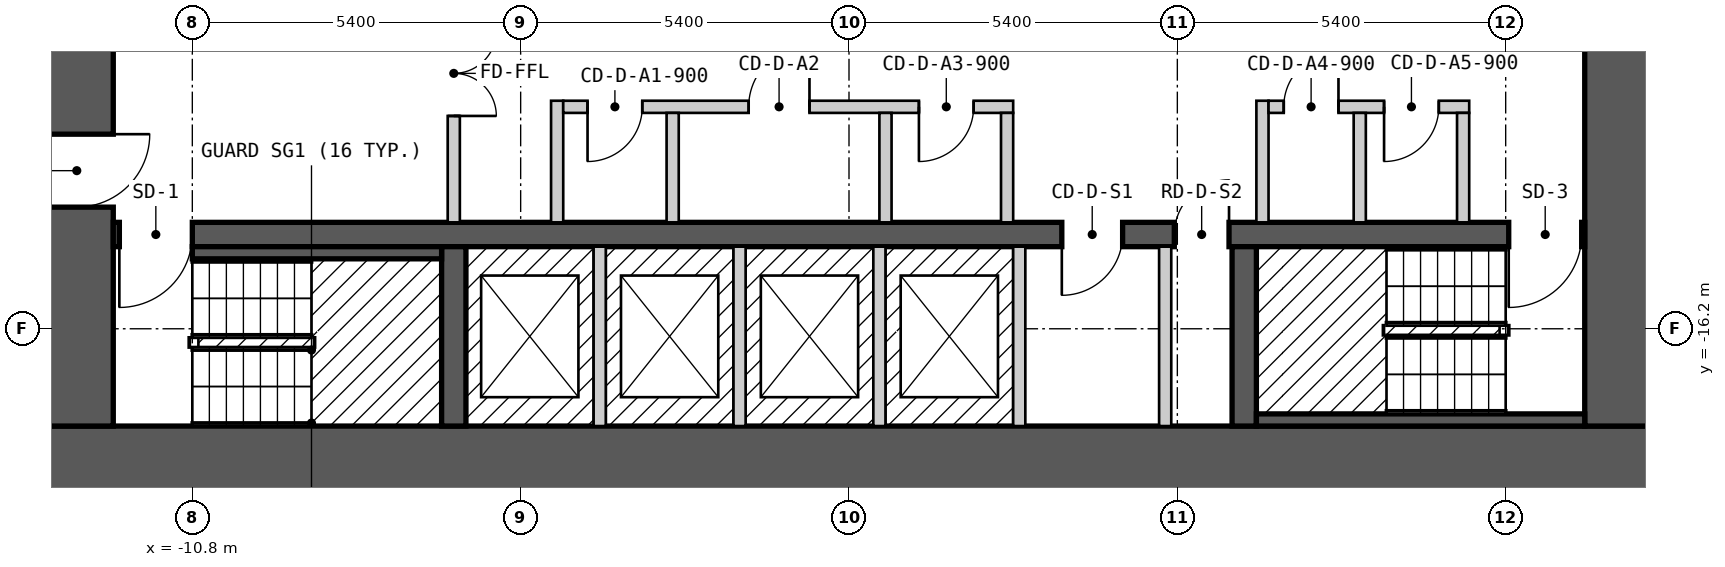
"""IFC4 building model, lengths in metres.
Left out: names, types, materials, properties, quantities, classifications, styles, units other than length and angle.
Written with IfcOpenShell. Run it as: python <this file> out.ifc"""

import sys

from ifc_helpers import new_model, si_unit, direction, frame, frame_2d, origin, place, context, subcontext, project, spatial, rectangle, extrude, element, fill, save


model = new_model("IFC4")
c1 = context("Model", 3, precision=1e-05, world=origin(), true_north=direction((0.0, 1.0)))
c2 = subcontext(c1, "Body", "Model", "MODEL_VIEW")
j1 = project(units=[si_unit("LENGTHUNIT", "METRE"), si_unit("PLANEANGLEUNIT", "RADIAN")], contexts=[c1])
p1 = place(None, origin())
s1 = spatial("IfcSite", under=j1, at=p1, CompositionType="ELEMENT")
p2 = place(p1, origin())
s2 = spatial("IfcBuilding", under=s1, at=p2, CompositionType="ELEMENT")
p3 = place(p2, frame((0.0, 0.0, 29.4)))
s3 = spatial("IfcBuildingStorey", under=s2, at=p3, CompositionType="ELEMENT", Elevation=29.4)
p4 = place(p3, frame((-13.3, -18.4, 0.0), z_axis=(0.0, 0.0, 1.0), x_axis=(1.0, 0.0, 0.0)))
e1 = element("IfcWall", 1, at=p4, inside=s3, PredefinedType="SHEAR", context=c2, shape_type="SweptSolid", body=[
    extrude(rectangle(XDim=26.6, YDim=1.2, at=frame_2d((13.3, 0.0))), origin(), (0.0, 0.0, 1.0), 2.7),
])
p5 = place(p3, frame((-12.7, -17.8, 0.0), z_axis=(0.0, 0.0, 1.0), x_axis=(0.0, 1.0, 0.0)))
e2 = element("IfcWall", 2, at=p5, inside=s3, PredefinedType="SHEAR", context=c2, shape_type="SweptSolid", body=[
    extrude(rectangle(XDim=11.6, YDim=1.2, at=frame_2d((5.8, 0.0))), origin(), (0.0, 0.0, 1.0), 2.7),
])
p6 = place(p5, frame((3.6, 0.0, 0.0)))
e3 = element("IfcOpeningElement", 3, at=p6, cuts=e2, PredefinedType="OPENING", context=c2, shape_type="SweptSolid", body=[
    extrude(rectangle(XDim=1.2, YDim=2.1, at=frame_2d((0.6, 1.05))), frame((0.0, 0.61, 0.0), z_axis=(0.0, -1.0, 0.0), x_axis=(1.0, 0.0, 0.0)), (0.0, 0.0, 1.0), 1.22),
])
p7 = place(p3, frame((12.7, -17.8, 0.0), z_axis=(0.0, 0.0, 1.0), x_axis=(0.0, 1.0, 0.0)))
e4 = element("IfcWall", 4, at=p7, inside=s3, PredefinedType="SHEAR", context=c2, shape_type="SweptSolid", body=[
    extrude(rectangle(XDim=11.6, YDim=1.2, at=frame_2d((5.8, 0.0))), origin(), (0.0, 0.0, 1.0), 2.7),
])
p8 = place(p3, frame((-12.1, -14.65, 0.0), z_axis=(0.0, 0.0, 1.0), x_axis=(1.0, 0.0, 0.0)))
e5 = element("IfcWall", 5, at=p8, inside=s3, PredefinedType="SHEAR", context=c2, shape_type="SweptSolid", body=[
    extrude(rectangle(XDim=24.2, YDim=0.4, at=frame_2d((12.1, 0.0))), origin(), (0.0, 0.0, 1.0), 2.7),
])
p9 = place(p8, frame((1.3, 0.0, 0.0), z_axis=(0.0, 0.0, 1.0), x_axis=(-1.0, 0.0, 0.0)))
e6 = element("IfcOpeningElement", 6, at=p9, cuts=e5, PredefinedType="OPENING", context=c2, shape_type="SweptSolid", body=[
    extrude(rectangle(XDim=1.2, YDim=2.1, at=frame_2d((0.6, 1.05))), frame((0.0, 0.21, 0.0), z_axis=(0.0, -1.0, 0.0), x_axis=(1.0, 0.0, 0.0)), (0.0, 0.0, 1.0), 0.42),
])
p10 = place(p8, frame((24.15, 0.0, 0.0), z_axis=(0.0, 0.0, 1.0), x_axis=(-1.0, 0.0, 0.0)))
e7 = element("IfcOpeningElement", 7, at=p10, cuts=e5, PredefinedType="OPENING", context=c2, shape_type="SweptSolid", body=[
    extrude(rectangle(XDim=1.2, YDim=2.1, at=frame_2d((0.6, 1.05))), frame((0.0, 0.21, 0.0), z_axis=(0.0, -1.0, 0.0), x_axis=(1.0, 0.0, 0.0)), (0.0, 0.0, 1.0), 0.42),
])
p11 = place(p8, frame((16.6, 0.0, 0.0), z_axis=(0.0, 0.0, 1.0), x_axis=(-1.0, 0.0, 0.0)))
e8 = element("IfcOpeningElement", 8, at=p11, cuts=e5, PredefinedType="OPENING", context=c2, shape_type="SweptSolid", body=[
    extrude(rectangle(XDim=1.0, YDim=2.1, at=frame_2d((0.5, 1.05))), frame((0.0, 0.21, 0.0), z_axis=(0.0, -1.0, 0.0), x_axis=(1.0, 0.0, 0.0)), (0.0, 0.0, 1.0), 0.42),
])
p12 = place(p8, frame((18.35, 0.0, 0.0), z_axis=(0.0, 0.0, 1.0), x_axis=(-1.0, 0.0, 0.0)))
e9 = element("IfcOpeningElement", 9, at=p12, cuts=e5, PredefinedType="OPENING", context=c2, shape_type="SweptSolid", body=[
    extrude(rectangle(XDim=0.9, YDim=2.1, at=frame_2d((0.45, 1.05))), frame((0.0, 0.21, 0.0), z_axis=(0.0, -1.0, 0.0), x_axis=(1.0, 0.0, 0.0)), (0.0, 0.0, 1.0), 0.42),
])
for number, where, z_axis, x_axis in (
    (10, (-6.5, -17.8, 0.0), (0.0, 0.0, 1.0), (0.0, 1.0, 0.0)),
    (11, (6.5, -17.8, 0.0), (0.0, 0.0, 1.0), (0.0, 1.0, 0.0)),
):
    element("IfcWall", number, at=place(p3, frame(where, z_axis=z_axis, x_axis=x_axis)), inside=s3, PredefinedType="SHEAR", context=c2, shape_type="SweptSolid", body=[
        extrude(rectangle(XDim=2.95, YDim=0.4, at=frame_2d((1.475, 0.0))), origin(), (0.0, 0.0, 1.0), 2.7),
    ])
p13 = place(p3, frame((-10.8, -14.95, 0.0), z_axis=(0.0, 0.0, 1.0), x_axis=(1.0, 0.0, 0.0)))
e12 = element("IfcWall", 12, at=p13, inside=s3, PredefinedType="SOLIDWALL", context=c2, shape_type="SweptSolid", body=[
    extrude(rectangle(XDim=4.1, YDim=0.2, at=frame_2d((2.05, 0.0))), origin(), (0.0, 0.0, 1.0), 2.7),
])
p14 = place(p3, frame((-6.5, -14.45, 0.0), z_axis=(0.0, 0.0, 1.0), x_axis=(0.0, 1.0, 0.0)))
e13 = element("IfcWall", 13, at=p14, inside=s3, PredefinedType="PARTITIONING", context=c2, shape_type="SweptSolid", body=[
    extrude(rectangle(XDim=4.9, YDim=0.2, at=frame_2d((2.45, 0.0))), origin(), (0.0, 0.0, 1.0), 2.7),
])
p15 = place(p14, frame((3.15, 0.0, 0.0), z_axis=(0.0, 0.0, 1.0), x_axis=(-1.0, 0.0, 0.0)))
e14 = element("IfcOpeningElement", 14, at=p15, cuts=e13, PredefinedType="OPENING", context=c2, shape_type="SweptSolid", body=[
    extrude(rectangle(XDim=1.4, YDim=2.1, at=frame_2d((0.7, 1.05))), frame((0.0, 0.11, 0.0), z_axis=(0.0, -1.0, 0.0), x_axis=(1.0, 0.0, 0.0)), (0.0, 0.0, 1.0), 0.22),
])
p16 = place(p3, frame((-4.8, -14.45, 0.0), z_axis=(0.0, 0.0, 1.0), x_axis=(0.0, 1.0, 0.0)))
e15 = element("IfcWall", 15, at=p16, inside=s3, PredefinedType="PARTITIONING", context=c2, shape_type="SweptSolid", body=[
    extrude(rectangle(XDim=2.0, YDim=0.2, at=frame_2d((1.0, 0.0))), origin(), (0.0, 0.0, 1.0), 2.7),
])
p17 = place(p3, frame((-4.7, -12.55, 0.0), z_axis=(0.0, 0.0, 1.0), x_axis=(1.0, 0.0, 0.0)))
e16 = element("IfcWall", 16, at=p17, inside=s3, PredefinedType="PARTITIONING", context=c2, shape_type="SweptSolid", body=[
    extrude(rectangle(XDim=7.4, YDim=0.2, at=frame_2d((3.7, 0.0))), origin(), (0.0, 0.0, 1.0), 2.7),
])
p18 = place(p17, frame((1.3, 0.0, 0.0), z_axis=(0.0, 0.0, 1.0), x_axis=(-1.0, 0.0, 0.0)))
e17 = element("IfcOpeningElement", 17, at=p18, cuts=e16, PredefinedType="OPENING", context=c2, shape_type="SweptSolid", body=[
    extrude(rectangle(XDim=0.9, YDim=2.1, at=frame_2d((0.45, 1.05))), frame((0.0, 0.11, 0.0), z_axis=(0.0, -1.0, 0.0), x_axis=(1.0, 0.0, 0.0)), (0.0, 0.0, 1.0), 0.22),
])
p19 = place(p17, frame((4.05, 0.0, 0.0), z_axis=(0.0, 0.0, 1.0), x_axis=(-1.0, 0.0, 0.0)))
e18 = element("IfcOpeningElement", 18, at=p19, cuts=e16, PredefinedType="OPENING", context=c2, shape_type="SweptSolid", body=[
    extrude(rectangle(XDim=1.0, YDim=2.1, at=frame_2d((0.5, 1.05))), frame((0.0, 0.11, 0.0), z_axis=(0.0, -1.0, 0.0), x_axis=(1.0, 0.0, 0.0)), (0.0, 0.0, 1.0), 0.22),
])
p20 = place(p17, frame((6.75, 0.0, 0.0), z_axis=(0.0, 0.0, 1.0), x_axis=(-1.0, 0.0, 0.0)))
e19 = element("IfcOpeningElement", 19, at=p20, cuts=e16, PredefinedType="OPENING", context=c2, shape_type="SweptSolid", body=[
    extrude(rectangle(XDim=0.9, YDim=2.1, at=frame_2d((0.45, 1.05))), frame((0.0, 0.11, 0.0), z_axis=(0.0, -1.0, 0.0), x_axis=(1.0, 0.0, 0.0)), (0.0, 0.0, 1.0), 0.22),
])
p21 = place(p3, frame((-4.1, -17.8, 0.0), z_axis=(0.0, 0.0, 1.0), x_axis=(0.0, 1.0, 0.0)))
e20 = element("IfcWall", 20, at=p21, inside=s3, PredefinedType="SOLIDWALL", context=c2, shape_type="SweptSolid", body=[
    extrude(rectangle(XDim=2.95, YDim=0.2, at=frame_2d((1.475, 0.0))), origin(), (0.0, 0.0, 1.0), 2.7),
])
p22 = place(p3, frame((-2.9, -14.45, 0.0), z_axis=(0.0, 0.0, 1.0), x_axis=(0.0, 1.0, 0.0)))
e21 = element("IfcWall", 21, at=p22, inside=s3, PredefinedType="PARTITIONING", context=c2, shape_type="SweptSolid", body=[
    extrude(rectangle(XDim=1.8, YDim=0.2, at=frame_2d((0.9, 0.0))), origin(), (0.0, 0.0, 1.0), 2.7),
])
for number, where, z_axis, x_axis in (
    (22, (-1.8, -17.8, 0.0), (0.0, 0.0, 1.0), (0.0, 1.0, 0.0)),
    (23, (0.5, -17.8, 0.0), (0.0, 0.0, 1.0), (0.0, 1.0, 0.0)),
):
    element("IfcWall", number, at=place(p3, frame(where, z_axis=z_axis, x_axis=x_axis)), inside=s3, PredefinedType="SOLIDWALL", context=c2, shape_type="SweptSolid", body=[
        extrude(rectangle(XDim=2.95, YDim=0.2, at=frame_2d((1.475, 0.0))), origin(), (0.0, 0.0, 1.0), 2.7),
    ])
for number, where, z_axis, x_axis in (
    (24, (0.6, -14.45, 0.0), (0.0, 0.0, 1.0), (0.0, 1.0, 0.0)),
    (25, (2.6, -14.45, 0.0), (0.0, 0.0, 1.0), (0.0, 1.0, 0.0)),
):
    element("IfcWall", number, at=place(p3, frame(where, z_axis=z_axis, x_axis=x_axis)), inside=s3, PredefinedType="PARTITIONING", context=c2, shape_type="SweptSolid", body=[
        extrude(rectangle(XDim=1.8, YDim=0.2, at=frame_2d((0.9, 0.0))), origin(), (0.0, 0.0, 1.0), 2.7),
    ])
p23 = place(p3, frame((2.8, -17.8, 0.0), z_axis=(0.0, 0.0, 1.0), x_axis=(0.0, 1.0, 0.0)))
e26 = element("IfcWall", 26, at=p23, inside=s3, PredefinedType="SOLIDWALL", context=c2, shape_type="SweptSolid", body=[
    extrude(rectangle(XDim=2.95, YDim=0.2, at=frame_2d((1.475, 0.0))), origin(), (0.0, 0.0, 1.0), 2.7),
])
p24 = place(p3, frame((5.2, -17.8, 0.0), z_axis=(0.0, 0.0, 1.0), x_axis=(0.0, 1.0, 0.0)))
e27 = element("IfcWall", 27, at=p24, inside=s3, PredefinedType="PARTITIONING", context=c2, shape_type="SweptSolid", body=[
    extrude(rectangle(XDim=2.95, YDim=0.2, at=frame_2d((1.475, 0.0))), origin(), (0.0, 0.0, 1.0), 2.7),
])
p25 = place(p3, frame((6.7, -17.7, 0.0), z_axis=(0.0, 0.0, 1.0), x_axis=(1.0, 0.0, 0.0)))
e28 = element("IfcWall", 28, at=p25, inside=s3, PredefinedType="SOLIDWALL", context=c2, shape_type="SweptSolid", body=[
    extrude(rectangle(XDim=5.4, YDim=0.2, at=frame_2d((2.7, 0.0))), origin(), (0.0, 0.0, 1.0), 2.7),
])
p26 = place(p3, frame((6.8, -14.45, 0.0), z_axis=(0.0, 0.0, 1.0), x_axis=(0.0, 1.0, 0.0)))
e29 = element("IfcWall", 29, at=p26, inside=s3, PredefinedType="PARTITIONING", context=c2, shape_type="SweptSolid", body=[
    extrude(rectangle(XDim=2.0, YDim=0.2, at=frame_2d((1.0, 0.0))), origin(), (0.0, 0.0, 1.0), 2.7),
])
p27 = place(p3, frame((6.9, -12.55, 0.0), z_axis=(0.0, 0.0, 1.0), x_axis=(1.0, 0.0, 0.0)))
e30 = element("IfcWall", 30, at=p27, inside=s3, PredefinedType="PARTITIONING", context=c2, shape_type="SweptSolid", body=[
    extrude(rectangle(XDim=3.3, YDim=0.2, at=frame_2d((1.65, 0.0))), origin(), (0.0, 0.0, 1.0), 2.7),
])
p28 = place(p27, frame((1.15, 0.0, 0.0), z_axis=(0.0, 0.0, 1.0), x_axis=(-1.0, 0.0, 0.0)))
e31 = element("IfcOpeningElement", 31, at=p28, cuts=e30, PredefinedType="OPENING", context=c2, shape_type="SweptSolid", body=[
    extrude(rectangle(XDim=0.9, YDim=2.1, at=frame_2d((0.45, 1.05))), frame((0.0, 0.11, 0.0), z_axis=(0.0, -1.0, 0.0), x_axis=(1.0, 0.0, 0.0)), (0.0, 0.0, 1.0), 0.22),
])
p29 = place(p27, frame((2.8, 0.0, 0.0), z_axis=(0.0, 0.0, 1.0), x_axis=(-1.0, 0.0, 0.0)))
e32 = element("IfcOpeningElement", 32, at=p29, cuts=e30, PredefinedType="OPENING", context=c2, shape_type="SweptSolid", body=[
    extrude(rectangle(XDim=0.9, YDim=2.1, at=frame_2d((0.45, 1.05))), frame((0.0, 0.11, 0.0), z_axis=(0.0, -1.0, 0.0), x_axis=(1.0, 0.0, 0.0)), (0.0, 0.0, 1.0), 0.22),
])
for number, where, z_axis, x_axis in (
    (33, (8.4, -14.45, 0.0), (0.0, 0.0, 1.0), (0.0, 1.0, 0.0)),
    (34, (10.1, -14.45, 0.0), (0.0, 0.0, 1.0), (0.0, 1.0, 0.0)),
):
    element("IfcWall", number, at=place(p3, frame(where, z_axis=z_axis, x_axis=x_axis)), inside=s3, PredefinedType="PARTITIONING", context=c2, shape_type="SweptSolid", body=[
        extrude(rectangle(XDim=1.8, YDim=0.2, at=frame_2d((0.9, 0.0))), origin(), (0.0, 0.0, 1.0), 2.7),
    ])
p30 = place(p9, origin())
e35 = element("IfcDoor", 35, at=p30, inside=s3, OperationType="SINGLE_SWING_RIGHT", PredefinedType="DOOR", context=c2, shape_type="SweptSolid", body=[
    extrude(rectangle(XDim=1.2, YDim=2.1, at=frame_2d((0.6, 1.05))), frame((0.0, 0.025, 0.0), z_axis=(0.0, -1.0, 0.0), x_axis=(1.0, 0.0, 0.0)), (0.0, 0.0, 1.0), 0.05),
])
fill(e6, e35)
p31 = place(p10, origin())
e36 = element("IfcDoor", 36, at=p31, inside=s3, OperationType="SINGLE_SWING_RIGHT", PredefinedType="DOOR", context=c2, shape_type="SweptSolid", body=[
    extrude(rectangle(XDim=1.2, YDim=2.1, at=frame_2d((0.6, 1.05))), frame((0.0, 0.025, 0.0), z_axis=(0.0, -1.0, 0.0), x_axis=(1.0, 0.0, 0.0)), (0.0, 0.0, 1.0), 0.05),
])
fill(e7, e36)
p32 = place(p6, origin())
e37 = element("IfcDoor", 37, at=p32, inside=s3, OperationType="SINGLE_SWING_RIGHT", PredefinedType="DOOR", context=c2, shape_type="SweptSolid", body=[
    extrude(rectangle(XDim=1.2, YDim=2.1, at=frame_2d((0.6, 1.05))), frame((0.0, 0.025, 0.0), z_axis=(0.0, -1.0, 0.0), x_axis=(1.0, 0.0, 0.0)), (0.0, 0.0, 1.0), 0.05),
])
fill(e3, e37)
p33 = place(p15, origin())
e38 = element("IfcDoor", 38, at=p33, inside=s3, OperationType="DOUBLE_DOOR_SINGLE_SWING", PredefinedType="DOOR", context=c2, shape_type="SweptSolid", body=[
    extrude(rectangle(XDim=1.4, YDim=2.1, at=frame_2d((0.7, 1.05))), frame((0.0, 0.025, 0.0), z_axis=(0.0, -1.0, 0.0), x_axis=(1.0, 0.0, 0.0)), (0.0, 0.0, 1.0), 0.05),
])
fill(e14, e38)
p34 = place(p18, origin())
e39 = element("IfcDoor", 39, at=p34, inside=s3, OperationType="SINGLE_SWING_RIGHT", PredefinedType="DOOR", context=c2, shape_type="SweptSolid", body=[
    extrude(rectangle(XDim=0.9, YDim=2.1, at=frame_2d((0.45, 1.05))), frame((0.0, 0.025, 0.0), z_axis=(0.0, -1.0, 0.0), x_axis=(1.0, 0.0, 0.0)), (0.0, 0.0, 1.0), 0.05),
])
fill(e17, e39)
p35 = place(p19, origin())
e40 = element("IfcDoor", 40, at=p35, inside=s3, OperationType="SINGLE_SWING_LEFT", PredefinedType="DOOR", context=c2, shape_type="SweptSolid", body=[
    extrude(rectangle(XDim=1.0, YDim=2.1, at=frame_2d((0.5, 1.05))), frame((0.0, 0.025, 0.0), z_axis=(0.0, -1.0, 0.0), x_axis=(1.0, 0.0, 0.0)), (0.0, 0.0, 1.0), 0.05),
])
fill(e18, e40)
p36 = place(p20, origin())
e41 = element("IfcDoor", 41, at=p36, inside=s3, OperationType="SINGLE_SWING_RIGHT", PredefinedType="DOOR", context=c2, shape_type="SweptSolid", body=[
    extrude(rectangle(XDim=0.9, YDim=2.1, at=frame_2d((0.45, 1.05))), frame((0.0, 0.025, 0.0), z_axis=(0.0, -1.0, 0.0), x_axis=(1.0, 0.0, 0.0)), (0.0, 0.0, 1.0), 0.05),
])
fill(e19, e41)
p37 = place(p28, origin())
e42 = element("IfcDoor", 42, at=p37, inside=s3, OperationType="SINGLE_SWING_LEFT", PredefinedType="DOOR", context=c2, shape_type="SweptSolid", body=[
    extrude(rectangle(XDim=0.9, YDim=2.1, at=frame_2d((0.45, 1.05))), frame((0.0, 0.025, 0.0), z_axis=(0.0, -1.0, 0.0), x_axis=(1.0, 0.0, 0.0)), (0.0, 0.0, 1.0), 0.05),
])
fill(e31, e42)
p38 = place(p29, origin())
e43 = element("IfcDoor", 43, at=p38, inside=s3, OperationType="SINGLE_SWING_RIGHT", PredefinedType="DOOR", context=c2, shape_type="SweptSolid", body=[
    extrude(rectangle(XDim=0.9, YDim=2.1, at=frame_2d((0.45, 1.05))), frame((0.0, 0.025, 0.0), z_axis=(0.0, -1.0, 0.0), x_axis=(1.0, 0.0, 0.0)), (0.0, 0.0, 1.0), 0.05),
])
fill(e32, e43)
p39 = place(p11, origin())
e44 = element("IfcDoor", 44, at=p39, inside=s3, OperationType="SINGLE_SWING_RIGHT", PredefinedType="DOOR", context=c2, shape_type="SweptSolid", body=[
    extrude(rectangle(XDim=1.0, YDim=2.1, at=frame_2d((0.5, 1.05))), frame((0.0, 0.025, 0.0), z_axis=(0.0, -1.0, 0.0), x_axis=(1.0, 0.0, 0.0)), (0.0, 0.0, 1.0), 0.05),
])
fill(e8, e44)
p40 = place(p12, origin())
e45 = element("IfcDoor", 45, at=p40, inside=s3, OperationType="SINGLE_SWING_LEFT", PredefinedType="DOOR", context=c2, shape_type="SweptSolid", body=[
    extrude(rectangle(XDim=0.9, YDim=2.1, at=frame_2d((0.45, 1.05))), frame((0.0, 0.025, 0.0), z_axis=(0.0, -1.0, 0.0), x_axis=(1.0, 0.0, 0.0)), (0.0, 0.0, 1.0), 0.05),
])
fill(e9, e45)
save(model, sys.argv[1])
